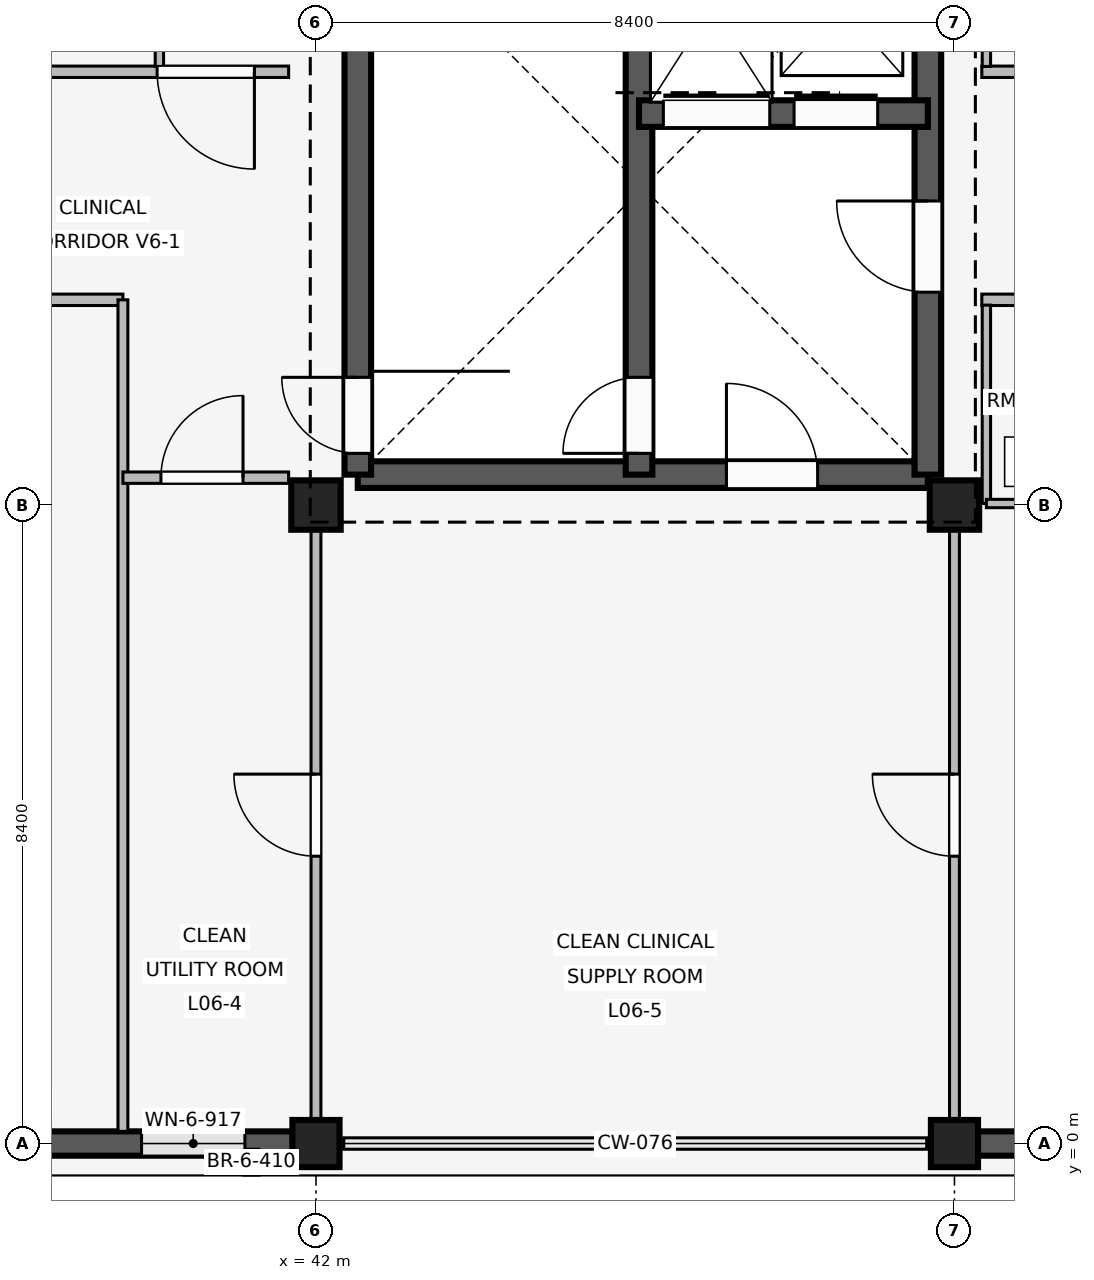
"""IFC4 building model, lengths in metres.
Left out: names, types, materials, properties, quantities, classifications, styles, units other than length and angle.
Written with IfcOpenShell. Run it as: python <this file> out.ifc"""

import sys

from ifc_helpers import new_model, si_unit, direction, frame, frame_2d, origin, origin_2d, place, context, subcontext, project, spatial, rectangle, extrude, element, fill, save


model = new_model("IFC4")
c1 = context("Model", 3, precision=1e-05, world=origin(), true_north=direction((0.0, 1.0)))
c2 = subcontext(c1, "Body", "Model", "MODEL_VIEW")
j1 = project(units=[si_unit("LENGTHUNIT", "METRE"), si_unit("PLANEANGLEUNIT", "RADIAN")], contexts=[c1])
p1 = place(None, origin())
s1 = spatial("IfcSite", under=j1, at=p1, CompositionType="ELEMENT")
p2 = place(p1, origin())
s2 = spatial("IfcBuilding", under=s1, at=p2, CompositionType="ELEMENT")
p3 = place(p2, frame((0.0, 0.0, 24.6)))
s3 = spatial("IfcBuildingStorey", under=s2, at=p3, CompositionType="ELEMENT", Elevation=24.6)
p4 = place(p3, frame((42.0, 0.0, 0.0), z_axis=(0.0, 0.0, 1.0), x_axis=(1.0, 0.0, 0.0)))
e1 = element("IfcColumn", 1, at=p4, inside=s3, PredefinedType="COLUMN", context=c2, shape_type="SweptSolid", body=[
    extrude(rectangle(XDim=0.62, YDim=0.62, at=origin_2d()), origin(), (0.0, 0.0, 1.0), 4.2),
])
p5 = place(p3, frame((42.0, 8.4, 0.0), z_axis=(0.0, 0.0, 1.0), x_axis=(1.0, 0.0, 0.0)))
e2 = element("IfcColumn", 2, at=p5, inside=s3, PredefinedType="COLUMN", context=c2, shape_type="SweptSolid", body=[
    extrude(rectangle(XDim=0.65, YDim=0.65, at=origin_2d()), origin(), (0.0, 0.0, 1.0), 4.2),
])
p6 = place(p3, frame((50.4, 0.0, 0.0), z_axis=(0.0, 0.0, 1.0), x_axis=(1.0, 0.0, 0.0)))
e3 = element("IfcColumn", 3, at=p6, inside=s3, PredefinedType="COLUMN", context=c2, shape_type="SweptSolid", body=[
    extrude(rectangle(XDim=0.62, YDim=0.62, at=origin_2d()), origin(), (0.0, 0.0, 1.0), 4.2),
])
p7 = place(p3, frame((50.4, 8.4, 0.0), z_axis=(0.0, 0.0, 1.0), x_axis=(1.0, 0.0, 0.0)))
e4 = element("IfcColumn", 4, at=p7, inside=s3, PredefinedType="COLUMN", context=c2, shape_type="SweptSolid", body=[
    extrude(rectangle(XDim=0.65, YDim=0.65, at=origin_2d()), origin(), (0.0, 0.0, 1.0), 4.2),
])
p8 = place(p3, frame((41.695, 0.0, 0.0), z_axis=(0.0, 0.0, 1.0), x_axis=(-1.0, 0.0, 0.0)))
e5 = element("IfcWall", 5, at=p8, inside=s3, PredefinedType="SOLIDWALL", context=c2, shape_type="SweptSolid", body=[
    extrude(rectangle(XDim=7.79, YDim=0.32, at=frame_2d((3.895, 0.0))), origin(), (0.0, 0.0, 1.0), 3.34),
])
p9 = place(p8, frame((0.63, 0.0, 0.85)))
e6 = element("IfcOpeningElement", 6, at=p9, cuts=e5, PredefinedType="OPENING", context=c2, shape_type="SweptSolid", body=[
    extrude(rectangle(XDim=1.36, YDim=1.42, at=frame_2d((0.68, 0.71))), frame((0.0, 0.17, 0.0), z_axis=(0.0, -1.0, 0.0), x_axis=(1.0, 0.0, 0.0)), (0.0, 0.0, 1.0), 0.34),
])
p10 = place(p8, frame((5.318, 0.0, 0.85)))
e7 = element("IfcOpeningElement", 7, at=p10, cuts=e5, PredefinedType="OPENING", context=c2, shape_type="SweptSolid", body=[
    extrude(rectangle(XDim=1.36, YDim=1.42, at=frame_2d((0.68, 0.71))), frame((0.0, 0.17, 0.0), z_axis=(0.0, -1.0, 0.0), x_axis=(1.0, 0.0, 0.0)), (0.0, 0.0, 1.0), 0.34),
])
p11 = place(p3, frame((41.15, -0.075, 0.0), z_axis=(0.0, 0.0, 1.0), x_axis=(0.0, -1.0, 0.0)))
e8 = element("IfcWall", 8, at=p11, inside=s3, PredefinedType="ELEMENTEDWALL", context=c2, shape_type="SweptSolid", body=[
    extrude(rectangle(XDim=0.34, YDim=0.2, at=frame_2d((0.17, 0.0))), origin(), (0.0, 0.0, 1.0), 3.32),
])
p12 = place(p3, frame((58.495, 0.0, 0.0), z_axis=(0.0, 0.0, 1.0), x_axis=(-1.0, 0.0, 0.0)))
e9 = element("IfcWall", 9, at=p12, inside=s3, PredefinedType="SOLIDWALL", context=c2, shape_type="SweptSolid", body=[
    extrude(rectangle(XDim=7.79, YDim=0.32, at=frame_2d((3.895, 0.0))), origin(), (0.0, 0.0, 1.0), 3.34),
])
p13 = place(p12, frame((1.172, 0.0, 0.85)))
e10 = element("IfcOpeningElement", 10, at=p13, cuts=e9, PredefinedType="OPENING", context=c2, shape_type="SweptSolid", body=[
    extrude(rectangle(XDim=1.24, YDim=1.34, at=frame_2d((0.62, 0.67))), frame((0.0, 0.17, 0.0), z_axis=(0.0, -1.0, 0.0), x_axis=(1.0, 0.0, 0.0)), (0.0, 0.0, 1.0), 0.34),
])
p14 = place(p12, frame((5.378, 0.0, 0.85)))
e11 = element("IfcOpeningElement", 11, at=p14, cuts=e9, PredefinedType="OPENING", context=c2, shape_type="SweptSolid", body=[
    extrude(rectangle(XDim=1.24, YDim=1.34, at=frame_2d((0.62, 0.67))), frame((0.0, 0.17, 0.0), z_axis=(0.0, -1.0, 0.0), x_axis=(1.0, 0.0, 0.0)), (0.0, 0.0, 1.0), 0.34),
])
p15 = place(p3, frame((42.55, 8.8, 0.0), z_axis=(0.0, 0.0, 1.0), x_axis=(1.0, 0.0, 0.0)))
e12 = element("IfcWall", 12, at=p15, inside=s3, PredefinedType="SHEAR", context=c2, shape_type="SweptSolid", body=[
    extrude(rectangle(XDim=7.5, YDim=0.35, at=frame_2d((3.75, 0.0))), origin(), (0.0, 0.0, 1.0), 3.92),
])
p16 = place(p15, frame((4.85, 0.0, 0.0)))
e13 = element("IfcOpeningElement", 13, at=p16, cuts=e12, PredefinedType="OPENING", context=c2, shape_type="SweptSolid", body=[
    extrude(rectangle(XDim=1.2, YDim=2.2, at=frame_2d((0.6, 1.1))), frame((0.0, 0.185, 0.0), z_axis=(0.0, -1.0, 0.0), x_axis=(1.0, 0.0, 0.0)), (0.0, 0.0, 1.0), 0.37),
])
p17 = place(p3, frame((42.55, 8.8, 0.0), z_axis=(0.0, 0.0, 1.0), x_axis=(0.0, 1.0, 0.0)))
e14 = element("IfcWall", 14, at=p17, inside=s3, PredefinedType="SHEAR", context=c2, shape_type="SweptSolid", body=[
    extrude(rectangle(XDim=7.55, YDim=0.35, at=frame_2d((3.775, 0.0))), origin(), (0.0, 0.0, 1.0), 3.92),
])
p18 = place(p17, frame((0.28, 0.0, 0.0)))
e15 = element("IfcOpeningElement", 15, at=p18, cuts=e14, PredefinedType="OPENING", context=c2, shape_type="SweptSolid", body=[
    extrude(rectangle(XDim=1.0, YDim=2.15, at=frame_2d((0.5, 1.075))), frame((0.0, 0.185, 0.0), z_axis=(0.0, -1.0, 0.0), x_axis=(1.0, 0.0, 0.0)), (0.0, 0.0, 1.0), 0.37),
])
p19 = place(p3, frame((50.05, 8.8, 0.0), z_axis=(0.0, 0.0, 1.0), x_axis=(0.0, 1.0, 0.0)))
e16 = element("IfcWall", 16, at=p19, inside=s3, PredefinedType="SHEAR", context=c2, shape_type="SweptSolid", body=[
    extrude(rectangle(XDim=7.55, YDim=0.35, at=frame_2d((3.775, 0.0))), origin(), (0.0, 0.0, 1.0), 3.92),
])
p20 = place(p19, frame((2.4, 0.0, 0.0)))
e17 = element("IfcOpeningElement", 17, at=p20, cuts=e16, PredefinedType="OPENING", context=c2, shape_type="SweptSolid", body=[
    extrude(rectangle(XDim=1.2, YDim=2.2, at=frame_2d((0.6, 1.1))), frame((0.0, 0.185, 0.0), z_axis=(0.0, -1.0, 0.0), x_axis=(1.0, 0.0, 0.0)), (0.0, 0.0, 1.0), 0.37),
])
p21 = place(p3, frame((46.25, 8.8, 0.0), z_axis=(0.0, 0.0, 1.0), x_axis=(0.0, 1.0, 0.0)))
e18 = element("IfcWall", 18, at=p21, inside=s3, PredefinedType="SHEAR", context=c2, shape_type="SweptSolid", body=[
    extrude(rectangle(XDim=7.55, YDim=0.35, at=frame_2d((3.775, 0.0))), origin(), (0.0, 0.0, 1.0), 3.92),
])
p22 = place(p21, frame((0.28, 0.0, 0.0)))
e19 = element("IfcOpeningElement", 19, at=p22, cuts=e18, PredefinedType="OPENING", context=c2, shape_type="SweptSolid", body=[
    extrude(rectangle(XDim=1.0, YDim=2.15, at=frame_2d((0.5, 1.075))), frame((0.0, 0.185, 0.0), z_axis=(0.0, -1.0, 0.0), x_axis=(1.0, 0.0, 0.0)), (0.0, 0.0, 1.0), 0.37),
])
p23 = place(p3, frame((46.25, 13.55, 0.0), z_axis=(0.0, 0.0, 1.0), x_axis=(1.0, 0.0, 0.0)))
e20 = element("IfcWall", 20, at=p23, inside=s3, PredefinedType="SHEAR", context=c2, shape_type="SweptSolid", body=[
    extrude(rectangle(XDim=3.8, YDim=0.35, at=frame_2d((1.9, 0.0))), origin(), (0.0, 0.0, 1.0), 3.92),
])
p24 = place(p23, frame((0.32, 0.0, 0.0)))
e21 = element("IfcOpeningElement", 21, at=p24, cuts=e20, PredefinedType="OPENING", context=c2, shape_type="SweptSolid", body=[
    extrude(rectangle(XDim=1.4, YDim=2.25, at=frame_2d((0.7, 1.125))), frame((0.0, 0.185, 0.0), z_axis=(0.0, -1.0, 0.0), x_axis=(1.0, 0.0, 0.0)), (0.0, 0.0, 1.0), 0.37),
])
p25 = place(p23, frame((2.04, 0.0, 0.0)))
e22 = element("IfcOpeningElement", 22, at=p25, cuts=e20, PredefinedType="OPENING", context=c2, shape_type="SweptSolid", body=[
    extrude(rectangle(XDim=1.1, YDim=2.15, at=frame_2d((0.55, 1.075))), frame((0.0, 0.185, 0.0), z_axis=(0.0, -1.0, 0.0), x_axis=(1.0, 0.0, 0.0)), (0.0, 0.0, 1.0), 0.37),
])
p26 = place(p3, frame((33.74, 11.1, 0.0), z_axis=(0.0, 0.0, 1.0), x_axis=(1.0, 0.0, 0.0)))
e23 = element("IfcWall", 23, at=p26, inside=s3, PredefinedType="PARTITIONING", context=c2, shape_type="SweptSolid", body=[
    extrude(rectangle(XDim=5.72, YDim=0.15, at=frame_2d((2.86, 0.0))), origin(), (0.0, 0.0, 1.0), 3.32),
])
p27 = place(p26, frame((2.32, 0.0, 0.0)))
e24 = element("IfcOpeningElement", 24, at=p27, cuts=e23, PredefinedType="OPENING", context=c2, shape_type="SweptSolid", body=[
    extrude(rectangle(XDim=1.25, YDim=2.2, at=frame_2d((0.625, 1.1))), frame((0.0, 0.085, 0.0), z_axis=(0.0, -1.0, 0.0), x_axis=(1.0, 0.0, 0.0)), (0.0, 0.0, 1.0), 0.17),
])
p28 = place(p3, frame((39.46, 0.16, 0.0), z_axis=(0.0, 0.0, 1.0), x_axis=(0.0, 1.0, 0.0)))
e25 = element("IfcWall", 25, at=p28, inside=s3, PredefinedType="PARTITIONING", context=c2, shape_type="SweptSolid", body=[
    extrude(rectangle(XDim=10.94, YDim=0.13, at=frame_2d((5.47, 0.0))), origin(), (0.0, 0.0, 1.0), 3.32),
])
p29 = place(p3, frame((39.46, 8.76, 0.0), z_axis=(0.0, 0.0, 1.0), x_axis=(1.0, 0.0, 0.0)))
e26 = element("IfcWall", 26, at=p29, inside=s3, PredefinedType="PARTITIONING", context=c2, shape_type="SweptSolid", body=[
    extrude(rectangle(XDim=2.18, YDim=0.15, at=frame_2d((1.09, 0.0))), origin(), (0.0, 0.0, 1.0), 3.32),
])
p30 = place(p29, frame((0.5, 0.0, 0.0)))
e27 = element("IfcOpeningElement", 27, at=p30, cuts=e26, PredefinedType="OPENING", context=c2, shape_type="SweptSolid", body=[
    extrude(rectangle(XDim=1.08, YDim=2.15, at=frame_2d((0.54, 1.075))), frame((0.0, 0.085, 0.0), z_axis=(0.0, -1.0, 0.0), x_axis=(1.0, 0.0, 0.0)), (0.0, 0.0, 1.0), 0.17),
])
p31 = place(p3, frame((41.64, 14.1, 0.0), z_axis=(0.0, 0.0, 1.0), x_axis=(-1.0, 0.0, 0.0)))
e28 = element("IfcWall", 28, at=p31, inside=s3, PredefinedType="PARTITIONING", context=c2, shape_type="SweptSolid", body=[
    extrude(rectangle(XDim=7.9, YDim=0.15, at=frame_2d((3.95, 0.0))), origin(), (0.0, 0.0, 1.0), 3.32),
])
p32 = place(p31, frame((0.45, 0.0, 0.0)))
e29 = element("IfcOpeningElement", 29, at=p32, cuts=e28, PredefinedType="OPENING", context=c2, shape_type="SweptSolid", body=[
    extrude(rectangle(XDim=1.28, YDim=2.2, at=frame_2d((0.64, 1.1))), frame((0.0, 0.085, 0.0), z_axis=(0.0, -1.0, 0.0), x_axis=(1.0, 0.0, 0.0)), (0.0, 0.0, 1.0), 0.17),
])
p33 = place(p31, frame((4.15, 0.0, 0.0)))
e30 = element("IfcOpeningElement", 30, at=p33, cuts=e28, PredefinedType="OPENING", context=c2, shape_type="SweptSolid", body=[
    extrude(rectangle(XDim=1.28, YDim=2.2, at=frame_2d((0.64, 1.1))), frame((0.0, 0.085, 0.0), z_axis=(0.0, -1.0, 0.0), x_axis=(1.0, 0.0, 0.0)), (0.0, 0.0, 1.0), 0.17),
])
p34 = place(p3, frame((39.94, 14.17, 0.0), z_axis=(0.0, 0.0, 1.0), x_axis=(0.0, 1.0, 0.0)))
e31 = element("IfcWall", 31, at=p34, inside=s3, PredefinedType="PARTITIONING", context=c2, shape_type="SweptSolid", body=[
    extrude(rectangle(XDim=2.61, YDim=0.11, at=frame_2d((1.305, 0.0))), origin(), (0.0, 0.0, 1.0), 3.32),
])
p35 = place(p3, frame((42.0, 0.14, 0.0), z_axis=(0.0, 0.0, 1.0), x_axis=(0.0, 1.0, 0.0)))
e32 = element("IfcWall", 32, at=p35, inside=s3, PredefinedType="PARTITIONING", context=c2, shape_type="SweptSolid", body=[
    extrude(rectangle(XDim=8.21, YDim=0.13, at=frame_2d((4.105, 0.0))), origin(), (0.0, 0.0, 1.0), 3.32),
])
p36 = place(p35, frame((3.64, 0.0, 0.0)))
e33 = element("IfcOpeningElement", 33, at=p36, cuts=e32, PredefinedType="OPENING", context=c2, shape_type="SweptSolid", body=[
    extrude(rectangle(XDim=1.08, YDim=2.15, at=frame_2d((0.54, 1.075))), frame((0.0, 0.075, 0.0), z_axis=(0.0, -1.0, 0.0), x_axis=(1.0, 0.0, 0.0)), (0.0, 0.0, 1.0), 0.15),
])
p37 = place(p3, frame((50.4, 0.14, 0.0), z_axis=(0.0, 0.0, 1.0), x_axis=(0.0, 1.0, 0.0)))
e34 = element("IfcWall", 34, at=p37, inside=s3, PredefinedType="PARTITIONING", context=c2, shape_type="SweptSolid", body=[
    extrude(rectangle(XDim=8.21, YDim=0.13, at=frame_2d((4.105, 0.0))), origin(), (0.0, 0.0, 1.0), 3.32),
])
p38 = place(p37, frame((3.64, 0.0, 0.0)))
e35 = element("IfcOpeningElement", 35, at=p38, cuts=e34, PredefinedType="OPENING", context=c2, shape_type="SweptSolid", body=[
    extrude(rectangle(XDim=1.08, YDim=2.15, at=frame_2d((0.54, 1.075))), frame((0.0, 0.075, 0.0), z_axis=(0.0, -1.0, 0.0), x_axis=(1.0, 0.0, 0.0)), (0.0, 0.0, 1.0), 0.15),
])
p39 = place(p3, frame((50.76, 11.1, 0.0), z_axis=(0.0, 0.0, 1.0), x_axis=(1.0, 0.0, 0.0)))
e36 = element("IfcWall", 36, at=p39, inside=s3, PredefinedType="PARTITIONING", context=c2, shape_type="SweptSolid", body=[
    extrude(rectangle(XDim=7.96, YDim=0.15, at=frame_2d((3.98, 0.0))), origin(), (0.0, 0.0, 1.0), 3.32),
])
p40 = place(p39, frame((2.25, 0.0, 0.0)))
e37 = element("IfcOpeningElement", 37, at=p40, cuts=e36, PredefinedType="OPENING", context=c2, shape_type="SweptSolid", body=[
    extrude(rectangle(XDim=1.35, YDim=2.25, at=frame_2d((0.675, 1.125))), frame((0.0, 0.085, 0.0), z_axis=(0.0, -1.0, 0.0), x_axis=(1.0, 0.0, 0.0)), (0.0, 0.0, 1.0), 0.17),
])
p41 = place(p39, frame((5.95, 0.0, 0.0)))
e38 = element("IfcOpeningElement", 38, at=p41, cuts=e36, PredefinedType="OPENING", context=c2, shape_type="SweptSolid", body=[
    extrude(rectangle(XDim=1.35, YDim=2.25, at=frame_2d((0.675, 1.125))), frame((0.0, 0.085, 0.0), z_axis=(0.0, -1.0, 0.0), x_axis=(1.0, 0.0, 0.0)), (0.0, 0.0, 1.0), 0.17),
])
p42 = place(p3, frame((50.82, 8.42, 0.0), z_axis=(0.0, 0.0, 1.0), x_axis=(0.0, 1.0, 0.0)))
e39 = element("IfcWall", 39, at=p42, inside=s3, PredefinedType="PARTITIONING", context=c2, shape_type="SweptSolid", body=[
    extrude(rectangle(XDim=2.61, YDim=0.11, at=frame_2d((1.305, 0.0))), origin(), (0.0, 0.0, 1.0), 3.32),
])
p43 = place(p3, frame((50.82, 8.42, 0.0), z_axis=(0.0, 0.0, 1.0), x_axis=(1.0, 0.0, 0.0)))
e40 = element("IfcWall", 40, at=p43, inside=s3, PredefinedType="PARTITIONING", context=c2, shape_type="SweptSolid", body=[
    extrude(rectangle(XDim=1.98, YDim=0.11, at=frame_2d((0.99, 0.0))), origin(), (0.0, 0.0, 1.0), 3.32),
])
p44 = place(p43, frame((0.54, 0.0, 0.0)))
e41 = element("IfcOpeningElement", 41, at=p44, cuts=e40, PredefinedType="OPENING", context=c2, shape_type="SweptSolid", body=[
    extrude(rectangle(XDim=0.9, YDim=2.1, at=frame_2d((0.45, 1.05))), frame((0.0, 0.065, 0.0), z_axis=(0.0, -1.0, 0.0), x_axis=(1.0, 0.0, 0.0)), (0.0, 0.0, 1.0), 0.13),
])
p45 = place(p3, frame((58.72, 14.1, 0.0), z_axis=(0.0, 0.0, 1.0), x_axis=(-1.0, 0.0, 0.0)))
e42 = element("IfcWall", 42, at=p45, inside=s3, PredefinedType="PARTITIONING", context=c2, shape_type="SweptSolid", body=[
    extrude(rectangle(XDim=7.96, YDim=0.15, at=frame_2d((3.98, 0.0))), origin(), (0.0, 0.0, 1.0), 3.32),
])
p46 = place(p45, frame((0.73, 0.0, 0.0)))
e43 = element("IfcOpeningElement", 43, at=p46, cuts=e42, PredefinedType="OPENING", context=c2, shape_type="SweptSolid", body=[
    extrude(rectangle(XDim=1.28, YDim=2.2, at=frame_2d((0.64, 1.1))), frame((0.0, 0.085, 0.0), z_axis=(0.0, -1.0, 0.0), x_axis=(1.0, 0.0, 0.0)), (0.0, 0.0, 1.0), 0.17),
])
p47 = place(p45, frame((4.43, 0.0, 0.0)))
e44 = element("IfcOpeningElement", 44, at=p47, cuts=e42, PredefinedType="OPENING", context=c2, shape_type="SweptSolid", body=[
    extrude(rectangle(XDim=1.28, YDim=2.2, at=frame_2d((0.64, 1.1))), frame((0.0, 0.085, 0.0), z_axis=(0.0, -1.0, 0.0), x_axis=(1.0, 0.0, 0.0)), (0.0, 0.0, 1.0), 0.17),
])
p48 = place(p3, frame((50.82, 14.17, 0.0), z_axis=(0.0, 0.0, 1.0), x_axis=(0.0, 1.0, 0.0)))
e45 = element("IfcWall", 45, at=p48, inside=s3, PredefinedType="PARTITIONING", context=c2, shape_type="SweptSolid", body=[
    extrude(rectangle(XDim=2.61, YDim=0.11, at=frame_2d((1.305, 0.0))), origin(), (0.0, 0.0, 1.0), 3.32),
])
p49 = place(p9, origin())
e46 = element("IfcWindow", 46, at=p49, inside=s3, PartitioningType="SINGLE_PANEL", PredefinedType="WINDOW", context=c2, shape_type="SweptSolid", body=[
    extrude(rectangle(XDim=1.36, YDim=1.42, at=frame_2d((0.68, 0.71))), frame((0.0, 0.03, 0.0), z_axis=(0.0, -1.0, 0.0), x_axis=(1.0, 0.0, 0.0)), (0.0, 0.0, 1.0), 0.06),
])
fill(e6, e46)
p50 = place(p20, origin())
e47 = element("IfcDoor", 47, at=p50, inside=s3, OperationType="SINGLE_SWING_RIGHT", PredefinedType="DOOR", context=c2, shape_type="SweptSolid", body=[
    extrude(rectangle(XDim=1.2, YDim=2.2, at=frame_2d((0.6, 1.1))), frame((0.0, 0.025, 0.0), z_axis=(0.0, -1.0, 0.0), x_axis=(1.0, 0.0, 0.0)), (0.0, 0.0, 1.0), 0.05),
])
fill(e17, e47)
p51 = place(p16, origin())
e48 = element("IfcDoor", 48, at=p51, inside=s3, OperationType="SINGLE_SWING_LEFT", PredefinedType="DOOR", context=c2, shape_type="SweptSolid", body=[
    extrude(rectangle(XDim=1.2, YDim=2.2, at=frame_2d((0.6, 1.1))), frame((0.0, 0.025, 0.0), z_axis=(0.0, -1.0, 0.0), x_axis=(1.0, 0.0, 0.0)), (0.0, 0.0, 1.0), 0.05),
])
fill(e13, e48)
p52 = place(p18, origin())
e49 = element("IfcDoor", 49, at=p52, inside=s3, OperationType="SINGLE_SWING_RIGHT", PredefinedType="DOOR", context=c2, shape_type="SweptSolid", body=[
    extrude(rectangle(XDim=1.0, YDim=2.15, at=frame_2d((0.5, 1.075))), frame((0.0, 0.025, 0.0), z_axis=(0.0, -1.0, 0.0), x_axis=(1.0, 0.0, 0.0)), (0.0, 0.0, 1.0), 0.05),
])
fill(e15, e49)
p53 = place(p22, origin())
e50 = element("IfcDoor", 50, at=p53, inside=s3, OperationType="SINGLE_SWING_LEFT", PredefinedType="DOOR", context=c2, shape_type="SweptSolid", body=[
    extrude(rectangle(XDim=1.0, YDim=2.15, at=frame_2d((0.5, 1.075))), frame((0.0, 0.025, 0.0), z_axis=(0.0, -1.0, 0.0), x_axis=(1.0, 0.0, 0.0)), (0.0, 0.0, 1.0), 0.05),
])
fill(e19, e50)
p54 = place(p24, origin())
e51 = element("IfcDoor", 51, at=p54, inside=s3, OperationType="SLIDING_TO_LEFT", PredefinedType="DOOR", context=c2, shape_type="SweptSolid", body=[
    extrude(rectangle(XDim=1.4, YDim=2.25, at=frame_2d((0.7, 1.125))), frame((0.0, 0.025, 0.0), z_axis=(0.0, -1.0, 0.0), x_axis=(1.0, 0.0, 0.0)), (0.0, 0.0, 1.0), 0.05),
])
fill(e21, e51)
p55 = place(p25, origin())
e52 = element("IfcDoor", 52, at=p55, inside=s3, OperationType="SLIDING_TO_LEFT", PredefinedType="DOOR", context=c2, shape_type="SweptSolid", body=[
    extrude(rectangle(XDim=1.1, YDim=2.15, at=frame_2d((0.55, 1.075))), frame((0.0, 0.025, 0.0), z_axis=(0.0, -1.0, 0.0), x_axis=(1.0, 0.0, 0.0)), (0.0, 0.0, 1.0), 0.05),
])
fill(e22, e52)
p56 = place(p30, origin())
e53 = element("IfcDoor", 53, at=p56, inside=s3, OperationType="SINGLE_SWING_RIGHT", PredefinedType="DOOR", context=c2, shape_type="SweptSolid", body=[
    extrude(rectangle(XDim=1.08, YDim=2.15, at=frame_2d((0.54, 1.075))), frame((0.0, 0.025, 0.0), z_axis=(0.0, -1.0, 0.0), x_axis=(1.0, 0.0, 0.0)), (0.0, 0.0, 1.0), 0.05),
])
fill(e27, e53)
p57 = place(p32, origin())
e54 = element("IfcDoor", 54, at=p57, inside=s3, OperationType="SINGLE_SWING_LEFT", PredefinedType="DOOR", context=c2, shape_type="SweptSolid", body=[
    extrude(rectangle(XDim=1.28, YDim=2.2, at=frame_2d((0.64, 1.1))), frame((0.0, 0.025, 0.0), z_axis=(0.0, -1.0, 0.0), x_axis=(1.0, 0.0, 0.0)), (0.0, 0.0, 1.0), 0.05),
])
fill(e29, e54)
p58 = place(p36, origin())
e55 = element("IfcDoor", 55, at=p58, inside=s3, OperationType="SINGLE_SWING_RIGHT", PredefinedType="DOOR", context=c2, shape_type="SweptSolid", body=[
    extrude(rectangle(XDim=1.08, YDim=2.15, at=frame_2d((0.54, 1.075))), frame((0.0, 0.025, 0.0), z_axis=(0.0, -1.0, 0.0), x_axis=(1.0, 0.0, 0.0)), (0.0, 0.0, 1.0), 0.05),
])
fill(e33, e55)
p59 = place(p38, origin())
e56 = element("IfcDoor", 56, at=p59, inside=s3, OperationType="SINGLE_SWING_RIGHT", PredefinedType="DOOR", context=c2, shape_type="SweptSolid", body=[
    extrude(rectangle(XDim=1.08, YDim=2.15, at=frame_2d((0.54, 1.075))), frame((0.0, 0.025, 0.0), z_axis=(0.0, -1.0, 0.0), x_axis=(1.0, 0.0, 0.0)), (0.0, 0.0, 1.0), 0.05),
])
fill(e35, e56)
save(model, sys.argv[1])
